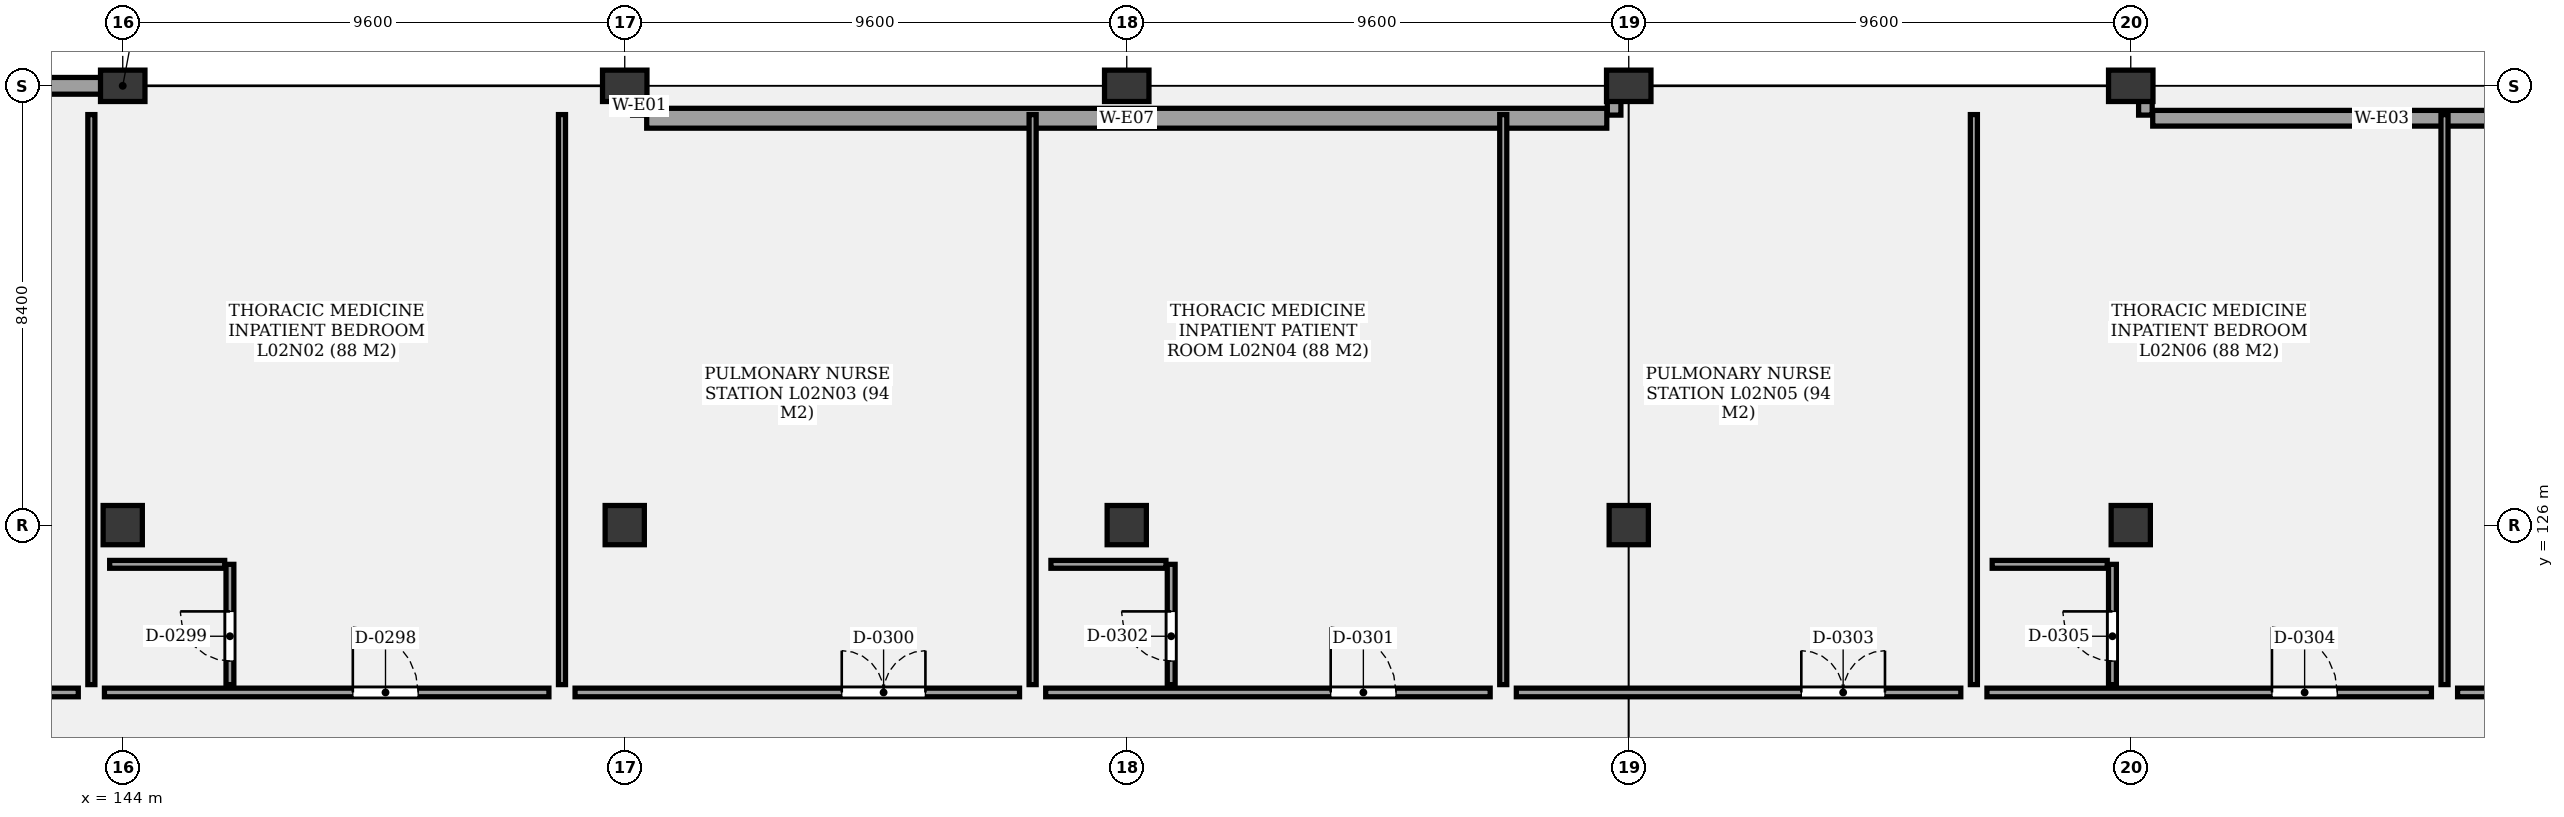
"""IFC4 building model, lengths in metres.
Left out: names, types, materials, properties, quantities, classifications, styles, units other than length and angle.
Written with IfcOpenShell. Run it as: python <this file> out.ifc"""

import sys

from ifc_helpers import new_model, si_unit, direction, frame, frame_2d, origin, origin_2d, place, context, subcontext, project, spatial, rectangle, extrude, element, fill, save


model = new_model("IFC4")
c1 = context("Model", 3, precision=1e-05, world=origin(), true_north=direction((0.0, 1.0)))
c2 = subcontext(c1, "Body", "Model", "MODEL_VIEW")
j1 = project(units=[si_unit("LENGTHUNIT", "METRE"), si_unit("PLANEANGLEUNIT", "RADIAN")], contexts=[c1])
p1 = place(None, origin())
s1 = spatial("IfcSite", under=j1, at=p1, CompositionType="ELEMENT")
p2 = place(p1, origin())
s2 = spatial("IfcBuilding", under=s1, at=p2, CompositionType="ELEMENT")
p3 = place(p2, frame((0.0, 0.0, 9.9)))
s3 = spatial("IfcBuildingStorey", under=s2, at=p3, CompositionType="ELEMENT", Elevation=9.9)
p4 = place(p3, frame((144.0, 126.0, 0.0), z_axis=(0.0, 0.0, 1.0), x_axis=(1.0, 0.0, 0.0)))
e1 = element("IfcColumn", 1, at=p4, inside=s3, PredefinedType="COLUMN", context=c2, shape_type="SweptSolid", body=[
    extrude(rectangle(XDim=0.75, YDim=0.75, at=origin_2d()), origin(), (0.0, 0.0, 1.0), 3.6),
])
p5 = place(p3, frame((144.0, 134.4, 0.0), z_axis=(0.0, 0.0, 1.0), x_axis=(1.0, 0.0, 0.0)))
e2 = element("IfcColumn", 2, at=p5, inside=s3, PredefinedType="COLUMN", context=c2, shape_type="SweptSolid", body=[
    extrude(rectangle(XDim=0.85, YDim=0.6, at=origin_2d()), origin(), (0.0, 0.0, 1.0), 3.6),
])
p6 = place(p3, frame((153.6, 126.0, 0.0), z_axis=(0.0, 0.0, 1.0), x_axis=(1.0, 0.0, 0.0)))
e3 = element("IfcColumn", 3, at=p6, inside=s3, PredefinedType="COLUMN", context=c2, shape_type="SweptSolid", body=[
    extrude(rectangle(XDim=0.75, YDim=0.75, at=origin_2d()), origin(), (0.0, 0.0, 1.0), 3.6),
])
p7 = place(p3, frame((153.6, 134.4, 0.0), z_axis=(0.0, 0.0, 1.0), x_axis=(1.0, 0.0, 0.0)))
e4 = element("IfcColumn", 4, at=p7, inside=s3, PredefinedType="COLUMN", context=c2, shape_type="SweptSolid", body=[
    extrude(rectangle(XDim=0.85, YDim=0.6, at=origin_2d()), origin(), (0.0, 0.0, 1.0), 3.6),
])
p8 = place(p3, frame((163.2, 126.0, 0.0), z_axis=(0.0, 0.0, 1.0), x_axis=(1.0, 0.0, 0.0)))
e5 = element("IfcColumn", 5, at=p8, inside=s3, PredefinedType="COLUMN", context=c2, shape_type="SweptSolid", body=[
    extrude(rectangle(XDim=0.75, YDim=0.75, at=origin_2d()), origin(), (0.0, 0.0, 1.0), 3.6),
])
p9 = place(p3, frame((163.2, 134.4, 0.0), z_axis=(0.0, 0.0, 1.0), x_axis=(1.0, 0.0, 0.0)))
e6 = element("IfcColumn", 6, at=p9, inside=s3, PredefinedType="COLUMN", context=c2, shape_type="SweptSolid", body=[
    extrude(rectangle(XDim=0.85, YDim=0.6, at=origin_2d()), origin(), (0.0, 0.0, 1.0), 3.6),
])
p10 = place(p3, frame((172.8, 126.0, 0.0), z_axis=(0.0, 0.0, 1.0), x_axis=(1.0, 0.0, 0.0)))
e7 = element("IfcColumn", 7, at=p10, inside=s3, PredefinedType="COLUMN", context=c2, shape_type="SweptSolid", body=[
    extrude(rectangle(XDim=0.75, YDim=0.75, at=origin_2d()), origin(), (0.0, 0.0, 1.0), 3.6),
])
p11 = place(p3, frame((172.8, 134.4, 0.0), z_axis=(0.0, 0.0, 1.0), x_axis=(1.0, 0.0, 0.0)))
e8 = element("IfcColumn", 8, at=p11, inside=s3, PredefinedType="COLUMN", context=c2, shape_type="SweptSolid", body=[
    extrude(rectangle(XDim=0.85, YDim=0.6, at=origin_2d()), origin(), (0.0, 0.0, 1.0), 3.6),
])
p12 = place(p3, frame((182.4, 126.0, 0.0), z_axis=(0.0, 0.0, 1.0), x_axis=(1.0, 0.0, 0.0)))
e9 = element("IfcColumn", 9, at=p12, inside=s3, PredefinedType="COLUMN", context=c2, shape_type="SweptSolid", body=[
    extrude(rectangle(XDim=0.75, YDim=0.75, at=origin_2d()), origin(), (0.0, 0.0, 1.0), 3.6),
])
p13 = place(p3, frame((182.4, 134.4, 0.0), z_axis=(0.0, 0.0, 1.0), x_axis=(1.0, 0.0, 0.0)))
e10 = element("IfcColumn", 10, at=p13, inside=s3, PredefinedType="COLUMN", context=c2, shape_type="SweptSolid", body=[
    extrude(rectangle(XDim=0.85, YDim=0.6, at=origin_2d()), origin(), (0.0, 0.0, 1.0), 3.6),
])
p14 = place(p3, frame((134.4, 134.4, 0.0), z_axis=(0.0, 0.0, 1.0), x_axis=(1.0, 0.0, 0.0)))
e11 = element("IfcWall", 11, at=p14, inside=s3, PredefinedType="SOLIDWALL", context=c2, shape_type="SweptSolid", body=[
    extrude(rectangle(XDim=9.6, YDim=0.32, at=frame_2d((4.8, 0.0))), origin(), (0.0, 0.0, 1.0), 2.57),
])
p15 = place(p14, frame((3.6, 0.0, 0.85)))
e12 = element("IfcOpeningElement", 12, at=p15, cuts=e11, PredefinedType="OPENING", context=c2, shape_type="SweptSolid", body=[
    extrude(rectangle(XDim=2.4, YDim=1.2, at=frame_2d((1.2, 0.6))), frame((0.0, 0.17, 0.0), z_axis=(0.0, -1.0, 0.0), x_axis=(1.0, 0.0, 0.0)), (0.0, 0.0, 1.0), 0.34),
])
for number, where, z_axis, x_axis in (
    (13, (153.88, 134.2, 0.0), (0.0, 0.0, 1.0), (0.0, -1.0, 0.0)),
    (14, (172.52, 134.2, 0.0), (0.0, 0.0, 1.0), (0.0, -1.0, 0.0)),
):
    element("IfcWall", number, at=place(p3, frame(where, z_axis=z_axis, x_axis=x_axis)), inside=s3, PredefinedType="SOLIDWALL", context=c2, shape_type="SweptSolid", body=[
        extrude(rectangle(XDim=0.36, YDim=0.26, at=frame_2d((0.18, 0.0))), origin(), (0.0, 0.0, 1.0), 2.57),
    ])
p16 = place(p3, frame((154.02, 133.78, 0.0), z_axis=(0.0, 0.0, 1.0), x_axis=(1.0, 0.0, 0.0)))
e15 = element("IfcWall", 15, at=p16, inside=s3, PredefinedType="SOLIDWALL", context=c2, shape_type="SweptSolid", body=[
    extrude(rectangle(XDim=18.36, YDim=0.38, at=frame_2d((9.18, 0.0))), origin(), (0.0, 0.0, 1.0), 2.57),
])
p17 = place(p3, frame((182.68, 134.2, 0.0), z_axis=(0.0, 0.0, 1.0), x_axis=(0.0, -1.0, 0.0)))
e16 = element("IfcWall", 16, at=p17, inside=s3, PredefinedType="SOLIDWALL", context=c2, shape_type="SweptSolid", body=[
    extrude(rectangle(XDim=0.36, YDim=0.26, at=frame_2d((0.18, 0.0))), origin(), (0.0, 0.0, 1.0), 2.57),
])
p18 = place(p3, frame((182.82, 133.78, 0.0), z_axis=(0.0, 0.0, 1.0), x_axis=(1.0, 0.0, 0.0)))
e17 = element("IfcWall", 17, at=p18, inside=s3, PredefinedType="SOLIDWALL", context=c2, shape_type="SweptSolid", body=[
    extrude(rectangle(XDim=8.76, YDim=0.3, at=frame_2d((4.38, 0.0))), origin(), (0.0, 0.0, 1.0), 2.57),
])
p19 = place(p3, frame((134.65, 122.8, 0.0), z_axis=(0.0, 0.0, 1.0), x_axis=(1.0, 0.0, 0.0)))
e18 = element("IfcWall", 18, at=p19, inside=s3, PredefinedType="PARTITIONING", context=c2, shape_type="SweptSolid", body=[
    extrude(rectangle(XDim=8.5, YDim=0.165, at=frame_2d((4.25, 0.0))), origin(), (0.0, 0.0, 1.0), 2.48),
])
p20 = place(p19, frame((4.75, 0.0, 0.0)))
e19 = element("IfcOpeningElement", 19, at=p20, cuts=e18, PredefinedType="OPENING", context=c2, shape_type="SweptSolid", body=[
    extrude(rectangle(XDim=1.6, YDim=2.2, at=frame_2d((0.8, 1.1))), frame((0.0, 0.093, 0.0), z_axis=(0.0, -1.0, 0.0), x_axis=(1.0, 0.0, 0.0)), (0.0, 0.0, 1.0), 0.185),
])
p21 = place(p3, frame((143.65, 122.8, 0.0), z_axis=(0.0, 0.0, 1.0), x_axis=(1.0, 0.0, 0.0)))
e20 = element("IfcWall", 20, at=p21, inside=s3, PredefinedType="PARTITIONING", context=c2, shape_type="SweptSolid", body=[
    extrude(rectangle(XDim=8.5, YDim=0.165, at=frame_2d((4.25, 0.0))), origin(), (0.0, 0.0, 1.0), 2.48),
])
p22 = place(p21, frame((4.75, 0.0, 0.0)))
e21 = element("IfcOpeningElement", 21, at=p22, cuts=e20, PredefinedType="OPENING", context=c2, shape_type="SweptSolid", body=[
    extrude(rectangle(XDim=1.25, YDim=2.2, at=frame_2d((0.625, 1.1))), frame((0.0, 0.093, 0.0), z_axis=(0.0, -1.0, 0.0), x_axis=(1.0, 0.0, 0.0)), (0.0, 0.0, 1.0), 0.185),
])
p23 = place(p3, frame((146.05, 122.95, 0.0), z_axis=(0.0, 0.0, 1.0), x_axis=(0.0, 1.0, 0.0)))
e22 = element("IfcWall", 22, at=p23, inside=s3, PredefinedType="PARTITIONING", context=c2, shape_type="SweptSolid", body=[
    extrude(rectangle(XDim=2.3, YDim=0.15, at=frame_2d((1.15, 0.0))), origin(), (0.0, 0.0, 1.0), 2.48),
])
p24 = place(p23, frame((0.45, 0.0, 0.0)))
e23 = element("IfcOpeningElement", 23, at=p24, cuts=e22, PredefinedType="OPENING", context=c2, shape_type="SweptSolid", body=[
    extrude(rectangle(XDim=0.95, YDim=2.1, at=frame_2d((0.475, 1.05))), frame((0.0, 0.085, 0.0), z_axis=(0.0, -1.0, 0.0), x_axis=(1.0, 0.0, 0.0)), (0.0, 0.0, 1.0), 0.17),
])
p25 = place(p3, frame((143.75, 125.25, 0.0), z_axis=(0.0, 0.0, 1.0), x_axis=(1.0, 0.0, 0.0)))
e24 = element("IfcWall", 24, at=p25, inside=s3, PredefinedType="PARTITIONING", context=c2, shape_type="SweptSolid", body=[
    extrude(rectangle(XDim=2.2, YDim=0.15, at=frame_2d((1.1, 0.0))), origin(), (0.0, 0.0, 1.0), 2.48),
])
p26 = place(p3, frame((143.4, 122.95, 0.0), z_axis=(0.0, 0.0, 1.0), x_axis=(0.0, 1.0, 0.0)))
e25 = element("IfcWall", 25, at=p26, inside=s3, PredefinedType="PARTITIONING", context=c2, shape_type="SweptSolid", body=[
    extrude(rectangle(XDim=10.9, YDim=0.135, at=frame_2d((5.45, 0.0))), origin(), (0.0, 0.0, 1.0), 2.48),
])
p27 = place(p3, frame((152.65, 122.8, 0.0), z_axis=(0.0, 0.0, 1.0), x_axis=(1.0, 0.0, 0.0)))
e26 = element("IfcWall", 26, at=p27, inside=s3, PredefinedType="PARTITIONING", context=c2, shape_type="SweptSolid", body=[
    extrude(rectangle(XDim=8.5, YDim=0.165, at=frame_2d((4.25, 0.0))), origin(), (0.0, 0.0, 1.0), 2.48),
])
p28 = place(p27, frame((5.1, 0.0, 0.0)))
e27 = element("IfcOpeningElement", 27, at=p28, cuts=e26, PredefinedType="OPENING", context=c2, shape_type="SweptSolid", body=[
    extrude(rectangle(XDim=1.6, YDim=2.2, at=frame_2d((0.8, 1.1))), frame((0.0, 0.093, 0.0), z_axis=(0.0, -1.0, 0.0), x_axis=(1.0, 0.0, 0.0)), (0.0, 0.0, 1.0), 0.185),
])
p29 = place(p3, frame((152.4, 122.95, 0.0), z_axis=(0.0, 0.0, 1.0), x_axis=(0.0, 1.0, 0.0)))
e28 = element("IfcWall", 28, at=p29, inside=s3, PredefinedType="PARTITIONING", context=c2, shape_type="SweptSolid", body=[
    extrude(rectangle(XDim=10.9, YDim=0.135, at=frame_2d((5.45, 0.0))), origin(), (0.0, 0.0, 1.0), 2.48),
])
p30 = place(p3, frame((161.65, 122.8, 0.0), z_axis=(0.0, 0.0, 1.0), x_axis=(1.0, 0.0, 0.0)))
e29 = element("IfcWall", 29, at=p30, inside=s3, PredefinedType="PARTITIONING", context=c2, shape_type="SweptSolid", body=[
    extrude(rectangle(XDim=8.5, YDim=0.165, at=frame_2d((4.25, 0.0))), origin(), (0.0, 0.0, 1.0), 2.48),
])
p31 = place(p30, frame((5.45, 0.0, 0.0)))
e30 = element("IfcOpeningElement", 30, at=p31, cuts=e29, PredefinedType="OPENING", context=c2, shape_type="SweptSolid", body=[
    extrude(rectangle(XDim=1.25, YDim=2.2, at=frame_2d((0.625, 1.1))), frame((0.0, 0.093, 0.0), z_axis=(0.0, -1.0, 0.0), x_axis=(1.0, 0.0, 0.0)), (0.0, 0.0, 1.0), 0.185),
])
p32 = place(p3, frame((164.05, 122.95, 0.0), z_axis=(0.0, 0.0, 1.0), x_axis=(0.0, 1.0, 0.0)))
e31 = element("IfcWall", 31, at=p32, inside=s3, PredefinedType="PARTITIONING", context=c2, shape_type="SweptSolid", body=[
    extrude(rectangle(XDim=2.3, YDim=0.15, at=frame_2d((1.15, 0.0))), origin(), (0.0, 0.0, 1.0), 2.48),
])
p33 = place(p32, frame((0.45, 0.0, 0.0)))
e32 = element("IfcOpeningElement", 32, at=p33, cuts=e31, PredefinedType="OPENING", context=c2, shape_type="SweptSolid", body=[
    extrude(rectangle(XDim=0.95, YDim=2.1, at=frame_2d((0.475, 1.05))), frame((0.0, 0.085, 0.0), z_axis=(0.0, -1.0, 0.0), x_axis=(1.0, 0.0, 0.0)), (0.0, 0.0, 1.0), 0.17),
])
p34 = place(p3, frame((161.75, 125.25, 0.0), z_axis=(0.0, 0.0, 1.0), x_axis=(1.0, 0.0, 0.0)))
e33 = element("IfcWall", 33, at=p34, inside=s3, PredefinedType="PARTITIONING", context=c2, shape_type="SweptSolid", body=[
    extrude(rectangle(XDim=2.2, YDim=0.15, at=frame_2d((1.1, 0.0))), origin(), (0.0, 0.0, 1.0), 2.48),
])
p35 = place(p3, frame((161.4, 122.95, 0.0), z_axis=(0.0, 0.0, 1.0), x_axis=(0.0, 1.0, 0.0)))
e34 = element("IfcWall", 34, at=p35, inside=s3, PredefinedType="PARTITIONING", context=c2, shape_type="SweptSolid", body=[
    extrude(rectangle(XDim=10.9, YDim=0.135, at=frame_2d((5.45, 0.0))), origin(), (0.0, 0.0, 1.0), 2.48),
])
p36 = place(p3, frame((170.65, 122.8, 0.0), z_axis=(0.0, 0.0, 1.0), x_axis=(1.0, 0.0, 0.0)))
e35 = element("IfcWall", 35, at=p36, inside=s3, PredefinedType="PARTITIONING", context=c2, shape_type="SweptSolid", body=[
    extrude(rectangle(XDim=8.5, YDim=0.165, at=frame_2d((4.25, 0.0))), origin(), (0.0, 0.0, 1.0), 2.48),
])
p37 = place(p36, frame((5.45, 0.0, 0.0)))
e36 = element("IfcOpeningElement", 36, at=p37, cuts=e35, PredefinedType="OPENING", context=c2, shape_type="SweptSolid", body=[
    extrude(rectangle(XDim=1.6, YDim=2.2, at=frame_2d((0.8, 1.1))), frame((0.0, 0.093, 0.0), z_axis=(0.0, -1.0, 0.0), x_axis=(1.0, 0.0, 0.0)), (0.0, 0.0, 1.0), 0.185),
])
p38 = place(p3, frame((170.4, 122.95, 0.0), z_axis=(0.0, 0.0, 1.0), x_axis=(0.0, 1.0, 0.0)))
e37 = element("IfcWall", 37, at=p38, inside=s3, PredefinedType="PARTITIONING", context=c2, shape_type="SweptSolid", body=[
    extrude(rectangle(XDim=10.9, YDim=0.135, at=frame_2d((5.45, 0.0))), origin(), (0.0, 0.0, 1.0), 2.48),
])
p39 = place(p3, frame((179.65, 122.8, 0.0), z_axis=(0.0, 0.0, 1.0), x_axis=(1.0, 0.0, 0.0)))
e38 = element("IfcWall", 38, at=p39, inside=s3, PredefinedType="PARTITIONING", context=c2, shape_type="SweptSolid", body=[
    extrude(rectangle(XDim=8.5, YDim=0.165, at=frame_2d((4.25, 0.0))), origin(), (0.0, 0.0, 1.0), 2.48),
])
p40 = place(p39, frame((5.45, 0.0, 0.0)))
e39 = element("IfcOpeningElement", 39, at=p40, cuts=e38, PredefinedType="OPENING", context=c2, shape_type="SweptSolid", body=[
    extrude(rectangle(XDim=1.25, YDim=2.2, at=frame_2d((0.625, 1.1))), frame((0.0, 0.093, 0.0), z_axis=(0.0, -1.0, 0.0), x_axis=(1.0, 0.0, 0.0)), (0.0, 0.0, 1.0), 0.185),
])
p41 = place(p3, frame((182.05, 122.95, 0.0), z_axis=(0.0, 0.0, 1.0), x_axis=(0.0, 1.0, 0.0)))
e40 = element("IfcWall", 40, at=p41, inside=s3, PredefinedType="PARTITIONING", context=c2, shape_type="SweptSolid", body=[
    extrude(rectangle(XDim=2.3, YDim=0.15, at=frame_2d((1.15, 0.0))), origin(), (0.0, 0.0, 1.0), 2.48),
])
p42 = place(p41, frame((0.45, 0.0, 0.0)))
e41 = element("IfcOpeningElement", 41, at=p42, cuts=e40, PredefinedType="OPENING", context=c2, shape_type="SweptSolid", body=[
    extrude(rectangle(XDim=0.95, YDim=2.1, at=frame_2d((0.475, 1.05))), frame((0.0, 0.085, 0.0), z_axis=(0.0, -1.0, 0.0), x_axis=(1.0, 0.0, 0.0)), (0.0, 0.0, 1.0), 0.17),
])
p43 = place(p3, frame((179.75, 125.25, 0.0), z_axis=(0.0, 0.0, 1.0), x_axis=(1.0, 0.0, 0.0)))
e42 = element("IfcWall", 42, at=p43, inside=s3, PredefinedType="PARTITIONING", context=c2, shape_type="SweptSolid", body=[
    extrude(rectangle(XDim=2.2, YDim=0.15, at=frame_2d((1.1, 0.0))), origin(), (0.0, 0.0, 1.0), 2.48),
])
p44 = place(p3, frame((179.4, 122.95, 0.0), z_axis=(0.0, 0.0, 1.0), x_axis=(0.0, 1.0, 0.0)))
e43 = element("IfcWall", 43, at=p44, inside=s3, PredefinedType="PARTITIONING", context=c2, shape_type="SweptSolid", body=[
    extrude(rectangle(XDim=10.9, YDim=0.135, at=frame_2d((5.45, 0.0))), origin(), (0.0, 0.0, 1.0), 2.48),
])
p45 = place(p3, frame((188.65, 122.8, 0.0), z_axis=(0.0, 0.0, 1.0), x_axis=(1.0, 0.0, 0.0)))
e44 = element("IfcWall", 44, at=p45, inside=s3, PredefinedType="PARTITIONING", context=c2, shape_type="SweptSolid", body=[
    extrude(rectangle(XDim=8.5, YDim=0.165, at=frame_2d((4.25, 0.0))), origin(), (0.0, 0.0, 1.0), 2.48),
])
p46 = place(p45, frame((5.45, 0.0, 0.0)))
e45 = element("IfcOpeningElement", 45, at=p46, cuts=e44, PredefinedType="OPENING", context=c2, shape_type="SweptSolid", body=[
    extrude(rectangle(XDim=1.6, YDim=2.2, at=frame_2d((0.8, 1.1))), frame((0.0, 0.093, 0.0), z_axis=(0.0, -1.0, 0.0), x_axis=(1.0, 0.0, 0.0)), (0.0, 0.0, 1.0), 0.185),
])
p47 = place(p3, frame((188.4, 122.95, 0.0), z_axis=(0.0, 0.0, 1.0), x_axis=(0.0, 1.0, 0.0)))
e46 = element("IfcWall", 46, at=p47, inside=s3, PredefinedType="PARTITIONING", context=c2, shape_type="SweptSolid", body=[
    extrude(rectangle(XDim=10.9, YDim=0.135, at=frame_2d((5.45, 0.0))), origin(), (0.0, 0.0, 1.0), 2.48),
])
p48 = place(p22, origin())
e47 = element("IfcDoor", 47, at=p48, inside=s3, OperationType="SINGLE_SWING_LEFT", PredefinedType="DOOR", context=c2, shape_type="SweptSolid", body=[
    extrude(rectangle(XDim=1.25, YDim=2.2, at=frame_2d((0.625, 1.1))), frame((0.0, 0.025, 0.0), z_axis=(0.0, -1.0, 0.0), x_axis=(1.0, 0.0, 0.0)), (0.0, 0.0, 1.0), 0.05),
])
fill(e21, e47)
p49 = place(p24, origin())
e48 = element("IfcDoor", 48, at=p49, inside=s3, OperationType="SINGLE_SWING_RIGHT", PredefinedType="DOOR", context=c2, shape_type="SweptSolid", body=[
    extrude(rectangle(XDim=0.95, YDim=2.1, at=frame_2d((0.475, 1.05))), frame((0.0, 0.025, 0.0), z_axis=(0.0, -1.0, 0.0), x_axis=(1.0, 0.0, 0.0)), (0.0, 0.0, 1.0), 0.05),
])
fill(e23, e48)
p50 = place(p28, origin())
e49 = element("IfcDoor", 49, at=p50, inside=s3, OperationType="DOUBLE_DOOR_SINGLE_SWING", PredefinedType="DOOR", context=c2, shape_type="SweptSolid", body=[
    extrude(rectangle(XDim=1.6, YDim=2.2, at=frame_2d((0.8, 1.1))), frame((0.0, 0.025, 0.0), z_axis=(0.0, -1.0, 0.0), x_axis=(1.0, 0.0, 0.0)), (0.0, 0.0, 1.0), 0.05),
])
fill(e27, e49)
p51 = place(p31, origin())
e50 = element("IfcDoor", 50, at=p51, inside=s3, OperationType="SINGLE_SWING_LEFT", PredefinedType="DOOR", context=c2, shape_type="SweptSolid", body=[
    extrude(rectangle(XDim=1.25, YDim=2.2, at=frame_2d((0.625, 1.1))), frame((0.0, 0.025, 0.0), z_axis=(0.0, -1.0, 0.0), x_axis=(1.0, 0.0, 0.0)), (0.0, 0.0, 1.0), 0.05),
])
fill(e30, e50)
p52 = place(p33, origin())
e51 = element("IfcDoor", 51, at=p52, inside=s3, OperationType="SINGLE_SWING_RIGHT", PredefinedType="DOOR", context=c2, shape_type="SweptSolid", body=[
    extrude(rectangle(XDim=0.95, YDim=2.1, at=frame_2d((0.475, 1.05))), frame((0.0, 0.025, 0.0), z_axis=(0.0, -1.0, 0.0), x_axis=(1.0, 0.0, 0.0)), (0.0, 0.0, 1.0), 0.05),
])
fill(e32, e51)
p53 = place(p37, origin())
e52 = element("IfcDoor", 52, at=p53, inside=s3, OperationType="DOUBLE_DOOR_SINGLE_SWING", PredefinedType="DOOR", context=c2, shape_type="SweptSolid", body=[
    extrude(rectangle(XDim=1.6, YDim=2.2, at=frame_2d((0.8, 1.1))), frame((0.0, 0.025, 0.0), z_axis=(0.0, -1.0, 0.0), x_axis=(1.0, 0.0, 0.0)), (0.0, 0.0, 1.0), 0.05),
])
fill(e36, e52)
p54 = place(p40, origin())
e53 = element("IfcDoor", 53, at=p54, inside=s3, OperationType="SINGLE_SWING_LEFT", PredefinedType="DOOR", context=c2, shape_type="SweptSolid", body=[
    extrude(rectangle(XDim=1.25, YDim=2.2, at=frame_2d((0.625, 1.1))), frame((0.0, 0.025, 0.0), z_axis=(0.0, -1.0, 0.0), x_axis=(1.0, 0.0, 0.0)), (0.0, 0.0, 1.0), 0.05),
])
fill(e39, e53)
p55 = place(p42, origin())
e54 = element("IfcDoor", 54, at=p55, inside=s3, OperationType="SINGLE_SWING_RIGHT", PredefinedType="DOOR", context=c2, shape_type="SweptSolid", body=[
    extrude(rectangle(XDim=0.95, YDim=2.1, at=frame_2d((0.475, 1.05))), frame((0.0, 0.025, 0.0), z_axis=(0.0, -1.0, 0.0), x_axis=(1.0, 0.0, 0.0)), (0.0, 0.0, 1.0), 0.05),
])
fill(e41, e54)
save(model, sys.argv[1])
